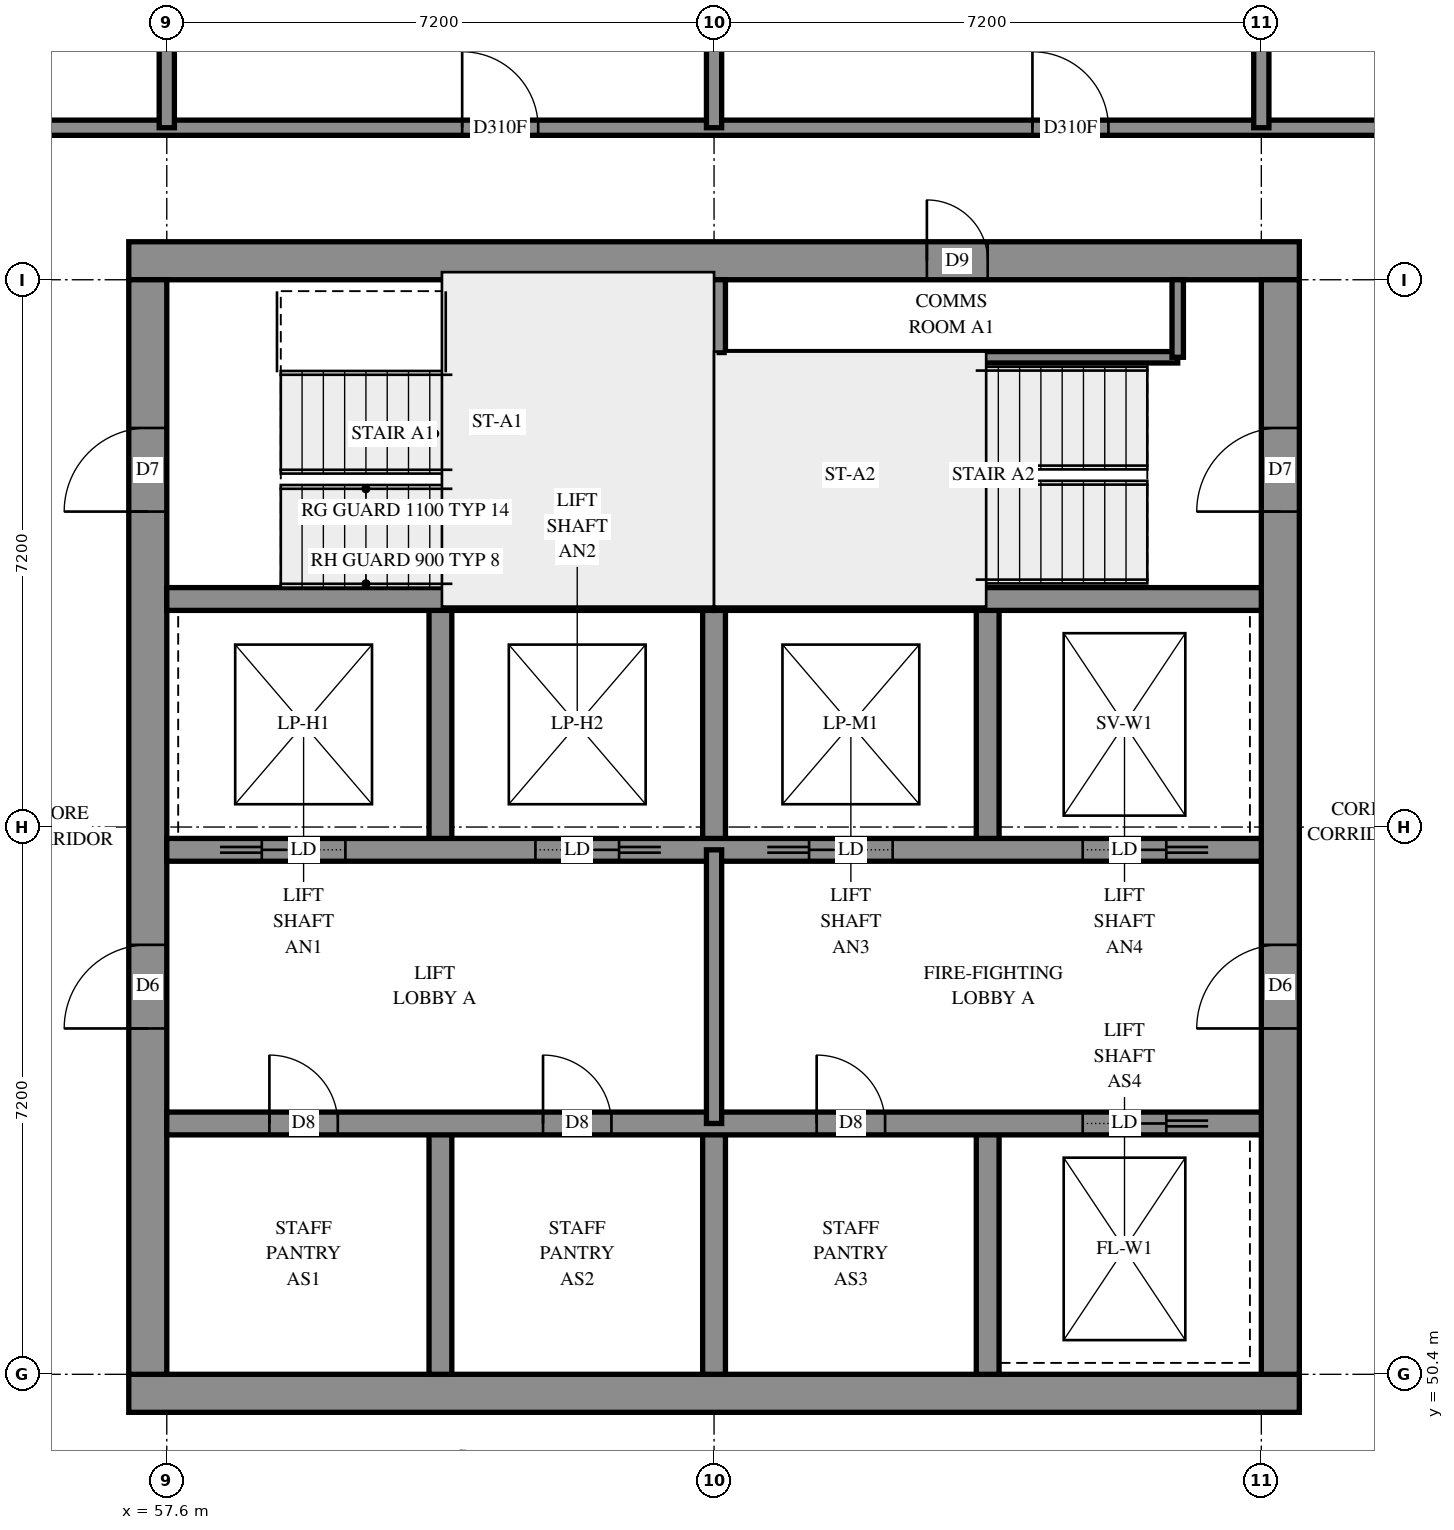
"""IFC4 building model, lengths in metres.
Left out: names, types, materials, properties, quantities, classifications, styles, units other than length and angle.
Written with IfcOpenShell. Run it as: python <this file> out.ifc"""

import sys

from ifc_helpers import new_model, si_unit, direction, frame, frame_2d, origin, place, context, subcontext, project, spatial, rectangle, extrude, element, fill, save


model = new_model("IFC4")
c1 = context("Model", 3, precision=1e-05, world=origin(), true_north=direction((0.0, 1.0)))
c2 = subcontext(c1, "Body", "Model", "MODEL_VIEW")
j1 = project(units=[si_unit("LENGTHUNIT", "METRE"), si_unit("PLANEANGLEUNIT", "RADIAN")], contexts=[c1])
p1 = place(None, origin())
s1 = spatial("IfcSite", under=j1, at=p1, CompositionType="ELEMENT")
p2 = place(p1, origin())
s2 = spatial("IfcBuilding", under=s1, at=p2, CompositionType="ELEMENT")
p3 = place(p2, frame((0.0, 0.0, 193.0)))
s3 = spatial("IfcBuildingStorey", under=s2, at=p3, CompositionType="ELEMENT", Elevation=193.0)
p4 = place(p3, frame((57.1, 50.15, -0.3), z_axis=(0.0, 0.0, 1.0), x_axis=(1.0, 0.0, 0.0)))
e1 = element("IfcWall", 1, at=p4, inside=s3, PredefinedType="SHEAR", context=c2, shape_type="SweptSolid", body=[
    extrude(rectangle(XDim=15.4, YDim=0.5, at=frame_2d((7.7, 0.0))), origin(), (0.0, 0.0, 1.0), 2.7),
])
p5 = place(p3, frame((57.1, 65.05, -0.3), z_axis=(0.0, 0.0, 1.0), x_axis=(1.0, 0.0, 0.0)))
e2 = element("IfcWall", 2, at=p5, inside=s3, PredefinedType="SHEAR", context=c2, shape_type="SweptSolid", body=[
    extrude(rectangle(XDim=15.4, YDim=0.5, at=frame_2d((7.7, 0.0))), origin(), (0.0, 0.0, 1.0), 2.7),
])
p6 = place(p5, frame((10.5, 0.0, 0.3)))
e3 = element("IfcOpeningElement", 3, at=p6, cuts=e2, PredefinedType="OPENING", context=c2, shape_type="SweptSolid", body=[
    extrude(rectangle(XDim=0.8, YDim=2.1, at=frame_2d((0.4, 1.05))), frame((0.0, 0.26, 0.0), z_axis=(0.0, -1.0, 0.0), x_axis=(1.0, 0.0, 0.0)), (0.0, 0.0, 1.0), 0.52),
])
p7 = place(p3, frame((57.35, 50.4, -0.3), z_axis=(0.0, 0.0, 1.0), x_axis=(0.0, 1.0, 0.0)))
e4 = element("IfcWall", 4, at=p7, inside=s3, PredefinedType="SHEAR", context=c2, shape_type="SweptSolid", body=[
    extrude(rectangle(XDim=14.4, YDim=0.5, at=frame_2d((7.2, 0.0))), origin(), (0.0, 0.0, 1.0), 2.7),
])
p8 = place(p7, frame((4.55, 0.0, 0.3)))
e5 = element("IfcOpeningElement", 5, at=p8, cuts=e4, PredefinedType="OPENING", context=c2, shape_type="SweptSolid", body=[
    extrude(rectangle(XDim=1.1, YDim=2.1, at=frame_2d((0.55, 1.05))), frame((0.0, 0.26, 0.0), z_axis=(0.0, -1.0, 0.0), x_axis=(1.0, 0.0, 0.0)), (0.0, 0.0, 1.0), 0.52),
])
p9 = place(p7, frame((11.35, 0.0, 0.3)))
e6 = element("IfcOpeningElement", 6, at=p9, cuts=e4, PredefinedType="OPENING", context=c2, shape_type="SweptSolid", body=[
    extrude(rectangle(XDim=1.1, YDim=2.1, at=frame_2d((0.55, 1.05))), frame((0.0, 0.26, 0.0), z_axis=(0.0, -1.0, 0.0), x_axis=(1.0, 0.0, 0.0)), (0.0, 0.0, 1.0), 0.52),
])
p10 = place(p3, frame((72.25, 50.4, -0.3), z_axis=(0.0, 0.0, 1.0), x_axis=(0.0, 1.0, 0.0)))
e7 = element("IfcWall", 7, at=p10, inside=s3, PredefinedType="SHEAR", context=c2, shape_type="SweptSolid", body=[
    extrude(rectangle(XDim=14.4, YDim=0.5, at=frame_2d((7.2, 0.0))), origin(), (0.0, 0.0, 1.0), 2.7),
])
p11 = place(p10, frame((4.55, 0.0, 0.3)))
e8 = element("IfcOpeningElement", 8, at=p11, cuts=e7, PredefinedType="OPENING", context=c2, shape_type="SweptSolid", body=[
    extrude(rectangle(XDim=1.1, YDim=2.1, at=frame_2d((0.55, 1.05))), frame((0.0, 0.26, 0.0), z_axis=(0.0, -1.0, 0.0), x_axis=(1.0, 0.0, 0.0)), (0.0, 0.0, 1.0), 0.52),
])
p12 = place(p10, frame((11.35, 0.0, 0.3)))
e9 = element("IfcOpeningElement", 9, at=p12, cuts=e7, PredefinedType="OPENING", context=c2, shape_type="SweptSolid", body=[
    extrude(rectangle(XDim=1.1, YDim=2.1, at=frame_2d((0.55, 1.05))), frame((0.0, 0.26, 0.0), z_axis=(0.0, -1.0, 0.0), x_axis=(1.0, 0.0, 0.0)), (0.0, 0.0, 1.0), 0.52),
])
for number, where, z_axis, x_axis in (
    (10, (61.2, 50.4, 0.0), (0.0, 0.0, 1.0), (0.0, 1.0, 0.0)),
    (11, (61.2, 57.3, 0.0), (0.0, 0.0, 1.0), (0.0, 1.0, 0.0)),
    (12, (64.8, 50.4, 0.0), (0.0, 0.0, 1.0), (0.0, 1.0, 0.0)),
    (13, (64.8, 57.3, 0.0), (0.0, 0.0, 1.0), (0.0, 1.0, 0.0)),
    (14, (68.4, 50.4, 0.0), (0.0, 0.0, 1.0), (0.0, 1.0, 0.0)),
    (15, (68.4, 57.3, 0.0), (0.0, 0.0, 1.0), (0.0, 1.0, 0.0)),
):
    element("IfcWall", number, at=place(p3, frame(where, z_axis=z_axis, x_axis=x_axis)), inside=s3, PredefinedType="SOLIDWALL", context=c2, shape_type="SweptSolid", body=[
        extrude(rectangle(XDim=3.3, YDim=0.3, at=frame_2d((1.65, 0.0))), origin(), (0.0, 0.0, 1.0), 3.1),
    ])
p13 = place(p3, frame((57.6, 53.7, 0.0), z_axis=(0.0, 0.0, 1.0), x_axis=(1.0, 0.0, 0.0)))
e16 = element("IfcWall", 16, at=p13, inside=s3, PredefinedType="SOLIDWALL", context=c2, shape_type="SweptSolid", body=[
    extrude(rectangle(XDim=14.4, YDim=0.3, at=frame_2d((7.2, 0.0))), origin(), (0.0, 0.0, 1.0), 3.1),
])
p14 = place(p13, frame((1.35, 0.0, 0.0)))
e17 = element("IfcOpeningElement", 17, at=p14, cuts=e16, PredefinedType="OPENING", context=c2, shape_type="SweptSolid", body=[
    extrude(rectangle(XDim=0.9, YDim=2.1, at=frame_2d((0.45, 1.05))), frame((0.0, 0.16, 0.0), z_axis=(0.0, -1.0, 0.0), x_axis=(1.0, 0.0, 0.0)), (0.0, 0.0, 1.0), 0.32),
])
p15 = place(p13, frame((4.95, 0.0, 0.0)))
e18 = element("IfcOpeningElement", 18, at=p15, cuts=e16, PredefinedType="OPENING", context=c2, shape_type="SweptSolid", body=[
    extrude(rectangle(XDim=0.9, YDim=2.1, at=frame_2d((0.45, 1.05))), frame((0.0, 0.16, 0.0), z_axis=(0.0, -1.0, 0.0), x_axis=(1.0, 0.0, 0.0)), (0.0, 0.0, 1.0), 0.32),
])
p16 = place(p13, frame((8.55, 0.0, 0.0)))
e19 = element("IfcOpeningElement", 19, at=p16, cuts=e16, PredefinedType="OPENING", context=c2, shape_type="SweptSolid", body=[
    extrude(rectangle(XDim=0.9, YDim=2.1, at=frame_2d((0.45, 1.05))), frame((0.0, 0.16, 0.0), z_axis=(0.0, -1.0, 0.0), x_axis=(1.0, 0.0, 0.0)), (0.0, 0.0, 1.0), 0.32),
])
p17 = place(p13, frame((12.05, 0.0, 0.0)))
e20 = element("IfcOpeningElement", 20, at=p17, cuts=e16, PredefinedType="OPENING", context=c2, shape_type="SweptSolid", body=[
    extrude(rectangle(XDim=1.1, YDim=2.1, at=frame_2d((0.55, 1.05))), frame((0.0, 0.16, 0.0), z_axis=(0.0, -1.0, 0.0), x_axis=(1.0, 0.0, 0.0)), (0.0, 0.0, 1.0), 0.32),
])
p18 = place(p3, frame((57.6, 57.3, 0.0), z_axis=(0.0, 0.0, 1.0), x_axis=(1.0, 0.0, 0.0)))
e21 = element("IfcWall", 21, at=p18, inside=s3, PredefinedType="SOLIDWALL", context=c2, shape_type="SweptSolid", body=[
    extrude(rectangle(XDim=14.4, YDim=0.3, at=frame_2d((7.2, 0.0))), origin(), (0.0, 0.0, 1.0), 3.1),
])
p19 = place(p18, frame((1.25, 0.0, 0.0)))
e22 = element("IfcOpeningElement", 22, at=p19, cuts=e21, PredefinedType="OPENING", context=c2, shape_type="SweptSolid", body=[
    extrude(rectangle(XDim=1.1, YDim=2.1, at=frame_2d((0.55, 1.05))), frame((0.0, 0.16, 0.0), z_axis=(0.0, -1.0, 0.0), x_axis=(1.0, 0.0, 0.0)), (0.0, 0.0, 1.0), 0.32),
])
p20 = place(p18, frame((4.85, 0.0, 0.0)))
e23 = element("IfcOpeningElement", 23, at=p20, cuts=e21, PredefinedType="OPENING", context=c2, shape_type="SweptSolid", body=[
    extrude(rectangle(XDim=1.1, YDim=2.1, at=frame_2d((0.55, 1.05))), frame((0.0, 0.16, 0.0), z_axis=(0.0, -1.0, 0.0), x_axis=(1.0, 0.0, 0.0)), (0.0, 0.0, 1.0), 0.32),
])
p21 = place(p18, frame((8.45, 0.0, 0.0)))
e24 = element("IfcOpeningElement", 24, at=p21, cuts=e21, PredefinedType="OPENING", context=c2, shape_type="SweptSolid", body=[
    extrude(rectangle(XDim=1.1, YDim=2.1, at=frame_2d((0.55, 1.05))), frame((0.0, 0.16, 0.0), z_axis=(0.0, -1.0, 0.0), x_axis=(1.0, 0.0, 0.0)), (0.0, 0.0, 1.0), 0.32),
])
p22 = place(p18, frame((12.05, 0.0, 0.0)))
e25 = element("IfcOpeningElement", 25, at=p22, cuts=e21, PredefinedType="OPENING", context=c2, shape_type="SweptSolid", body=[
    extrude(rectangle(XDim=1.1, YDim=2.1, at=frame_2d((0.55, 1.05))), frame((0.0, 0.16, 0.0), z_axis=(0.0, -1.0, 0.0), x_axis=(1.0, 0.0, 0.0)), (0.0, 0.0, 1.0), 0.32),
])
for number, where, z_axis, x_axis in (
    (26, (57.6, 60.6, 0.0), (0.0, 0.0, 1.0), (1.0, 0.0, 0.0)),
    (27, (64.8, 60.6, 0.0), (0.0, 0.0, 1.0), (1.0, 0.0, 0.0)),
):
    element("IfcWall", number, at=place(p3, frame(where, z_axis=z_axis, x_axis=x_axis)), inside=s3, PredefinedType="SOLIDWALL", context=c2, shape_type="SweptSolid", body=[
        extrude(rectangle(XDim=7.2, YDim=0.3, at=frame_2d((3.6, 0.0))), origin(), (0.0, 0.0, 1.0), 3.1),
    ])
p23 = place(p3, frame((64.8, 60.6, 0.0), z_axis=(0.0, 0.0, 1.0), x_axis=(0.0, 1.0, 0.0)))
e28 = element("IfcWall", 28, at=p23, inside=s3, PredefinedType="SOLIDWALL", context=c2, shape_type="SweptSolid", body=[
    extrude(rectangle(XDim=4.2, YDim=0.3, at=frame_2d((2.1, 0.0))), origin(), (0.0, 0.0, 1.0), 3.1),
])
p24 = place(p3, frame((64.95, 63.78, 0.0), z_axis=(0.0, 0.0, 1.0), x_axis=(1.0, 0.0, 0.0)))
e29 = element("IfcWall", 29, at=p24, inside=s3, PredefinedType="PARTITIONING", context=c2, shape_type="SweptSolid", body=[
    extrude(rectangle(XDim=5.95, YDim=0.15, at=frame_2d((2.975, 0.0))), origin(), (0.0, 0.0, 1.0), 3.1),
])
p25 = place(p3, frame((70.9, 63.78, 0.0), z_axis=(0.0, 0.0, 1.0), x_axis=(0.0, 1.0, 0.0)))
e30 = element("IfcWall", 30, at=p25, inside=s3, PredefinedType="PARTITIONING", context=c2, shape_type="SweptSolid", body=[
    extrude(rectangle(XDim=1.02, YDim=0.15, at=frame_2d((0.51, 0.0))), origin(), (0.0, 0.0, 1.0), 3.1),
])
p26 = place(p3, frame((64.8, 53.7, 0.0), z_axis=(0.0, 0.0, 1.0), x_axis=(0.0, 1.0, 0.0)))
e31 = element("IfcWall", 31, at=p26, inside=s3, PredefinedType="PARTITIONING", context=c2, shape_type="SweptSolid", body=[
    extrude(rectangle(XDim=3.6, YDim=0.2, at=frame_2d((1.8, 0.0))), origin(), (0.0, 0.0, 1.0), 3.1),
])
p27 = place(p3, frame((55.6, 66.8, 0.0), z_axis=(0.0, 0.0, 1.0), x_axis=(1.0, 0.0, 0.0)))
e32 = element("IfcWall", 32, at=p27, inside=s3, PredefinedType="PARTITIONING", context=c2, shape_type="SweptSolid", body=[
    extrude(rectangle(XDim=18.4, YDim=0.2, at=frame_2d((9.2, 0.0))), origin(), (0.0, 0.0, 1.0), 3.1),
])
p28 = place(p27, frame((5.886, 0.0, 0.0)))
e33 = element("IfcOpeningElement", 33, at=p28, cuts=e32, PredefinedType="OPENING", context=c2, shape_type="SweptSolid", body=[
    extrude(rectangle(XDim=1.0, YDim=2.1, at=frame_2d((0.5, 1.05))), frame((0.0, 0.11, 0.0), z_axis=(0.0, -1.0, 0.0), x_axis=(1.0, 0.0, 0.0)), (0.0, 0.0, 1.0), 0.22),
])
p29 = place(p27, frame((13.389, 0.0, 0.0)))
e34 = element("IfcOpeningElement", 34, at=p29, cuts=e32, PredefinedType="OPENING", context=c2, shape_type="SweptSolid", body=[
    extrude(rectangle(XDim=1.0, YDim=2.1, at=frame_2d((0.5, 1.05))), frame((0.0, 0.11, 0.0), z_axis=(0.0, -1.0, 0.0), x_axis=(1.0, 0.0, 0.0)), (0.0, 0.0, 1.0), 0.22),
])
for number, where, z_axis, x_axis in (
    (35, (57.6, 66.8, 0.0), (0.0, 0.0, 1.0), (0.0, 1.0, 0.0)),
    (36, (64.8, 66.8, 0.0), (0.0, 0.0, 1.0), (0.0, 1.0, 0.0)),
):
    element("IfcWall", number, at=place(p3, frame(where, z_axis=z_axis, x_axis=x_axis)), inside=s3, PredefinedType="PARTITIONING", context=c2, shape_type="SweptSolid", body=[
        extrude(rectangle(XDim=4.8, YDim=0.2, at=frame_2d((2.4, 0.0))), origin(), (0.0, 0.0, 1.0), 3.1),
    ])
p30 = place(p3, frame((72.0, 66.8, 0.0), z_axis=(0.0, 0.0, 1.0), x_axis=(0.0, 1.0, 0.0)))
e37 = element("IfcWall", 37, at=p30, inside=s3, PredefinedType="PARTITIONING", context=c2, shape_type="SweptSolid", body=[
    extrude(rectangle(XDim=4.696, YDim=0.2, at=frame_2d((2.348, 0.0))), origin(), (0.0, 0.0, 1.0), 3.1),
])
p31 = place(p6, origin())
e38 = element("IfcDoor", 38, at=p31, inside=s3, OperationType="SINGLE_SWING_RIGHT", PredefinedType="DOOR", context=c2, shape_type="SweptSolid", body=[
    extrude(rectangle(XDim=0.8, YDim=2.1, at=frame_2d((0.4, 1.05))), frame((0.0, 0.025, 0.0), z_axis=(0.0, -1.0, 0.0), x_axis=(1.0, 0.0, 0.0)), (0.0, 0.0, 1.0), 0.05),
])
fill(e3, e38)
p32 = place(p8, origin())
e39 = element("IfcDoor", 39, at=p32, inside=s3, OperationType="DOUBLE_DOOR_SINGLE_SWING", PredefinedType="DOOR", context=c2, shape_type="SweptSolid", body=[
    extrude(rectangle(XDim=1.1, YDim=2.1, at=frame_2d((0.55, 1.05))), frame((0.0, 0.025, 0.0), z_axis=(0.0, -1.0, 0.0), x_axis=(1.0, 0.0, 0.0)), (0.0, 0.0, 1.0), 0.05),
])
fill(e5, e39)
p33 = place(p11, origin())
e40 = element("IfcDoor", 40, at=p33, inside=s3, OperationType="DOUBLE_DOOR_SINGLE_SWING", PredefinedType="DOOR", context=c2, shape_type="SweptSolid", body=[
    extrude(rectangle(XDim=1.1, YDim=2.1, at=frame_2d((0.55, 1.05))), frame((0.0, 0.025, 0.0), z_axis=(0.0, -1.0, 0.0), x_axis=(1.0, 0.0, 0.0)), (0.0, 0.0, 1.0), 0.05),
])
fill(e8, e40)
p34 = place(p9, origin())
e41 = element("IfcDoor", 41, at=p34, inside=s3, OperationType="SINGLE_SWING_LEFT", PredefinedType="DOOR", context=c2, shape_type="SweptSolid", body=[
    extrude(rectangle(XDim=1.1, YDim=2.1, at=frame_2d((0.55, 1.05))), frame((0.0, 0.025, 0.0), z_axis=(0.0, -1.0, 0.0), x_axis=(1.0, 0.0, 0.0)), (0.0, 0.0, 1.0), 0.05),
])
fill(e6, e41)
p35 = place(p12, origin())
e42 = element("IfcDoor", 42, at=p35, inside=s3, OperationType="SINGLE_SWING_RIGHT", PredefinedType="DOOR", context=c2, shape_type="SweptSolid", body=[
    extrude(rectangle(XDim=1.1, YDim=2.1, at=frame_2d((0.55, 1.05))), frame((0.0, 0.025, 0.0), z_axis=(0.0, -1.0, 0.0), x_axis=(1.0, 0.0, 0.0)), (0.0, 0.0, 1.0), 0.05),
])
fill(e9, e42)
p36 = place(p14, origin())
e43 = element("IfcDoor", 43, at=p36, inside=s3, OperationType="SINGLE_SWING_LEFT", PredefinedType="DOOR", context=c2, shape_type="SweptSolid", body=[
    extrude(rectangle(XDim=0.9, YDim=2.1, at=frame_2d((0.45, 1.05))), frame((0.0, 0.025, 0.0), z_axis=(0.0, -1.0, 0.0), x_axis=(1.0, 0.0, 0.0)), (0.0, 0.0, 1.0), 0.05),
])
fill(e17, e43)
p37 = place(p15, origin())
e44 = element("IfcDoor", 44, at=p37, inside=s3, OperationType="SINGLE_SWING_LEFT", PredefinedType="DOOR", context=c2, shape_type="SweptSolid", body=[
    extrude(rectangle(XDim=0.9, YDim=2.1, at=frame_2d((0.45, 1.05))), frame((0.0, 0.025, 0.0), z_axis=(0.0, -1.0, 0.0), x_axis=(1.0, 0.0, 0.0)), (0.0, 0.0, 1.0), 0.05),
])
fill(e18, e44)
p38 = place(p16, origin())
e45 = element("IfcDoor", 45, at=p38, inside=s3, OperationType="SINGLE_SWING_LEFT", PredefinedType="DOOR", context=c2, shape_type="SweptSolid", body=[
    extrude(rectangle(XDim=0.9, YDim=2.1, at=frame_2d((0.45, 1.05))), frame((0.0, 0.025, 0.0), z_axis=(0.0, -1.0, 0.0), x_axis=(1.0, 0.0, 0.0)), (0.0, 0.0, 1.0), 0.05),
])
fill(e19, e45)
p39 = place(p17, origin())
e46 = element("IfcDoor", 46, at=p39, inside=s3, OperationType="SLIDING_TO_RIGHT", PredefinedType="DOOR", context=c2, shape_type="SweptSolid", body=[
    extrude(rectangle(XDim=1.1, YDim=2.1, at=frame_2d((0.55, 1.05))), frame((0.0, 0.025, 0.0), z_axis=(0.0, -1.0, 0.0), x_axis=(1.0, 0.0, 0.0)), (0.0, 0.0, 1.0), 0.05),
])
fill(e20, e46)
p40 = place(p19, origin())
e47 = element("IfcDoor", 47, at=p40, inside=s3, OperationType="SLIDING_TO_LEFT", PredefinedType="DOOR", context=c2, shape_type="SweptSolid", body=[
    extrude(rectangle(XDim=1.1, YDim=2.1, at=frame_2d((0.55, 1.05))), frame((0.0, 0.025, 0.0), z_axis=(0.0, -1.0, 0.0), x_axis=(1.0, 0.0, 0.0)), (0.0, 0.0, 1.0), 0.05),
])
fill(e22, e47)
p41 = place(p20, origin())
e48 = element("IfcDoor", 48, at=p41, inside=s3, OperationType="SLIDING_TO_RIGHT", PredefinedType="DOOR", context=c2, shape_type="SweptSolid", body=[
    extrude(rectangle(XDim=1.1, YDim=2.1, at=frame_2d((0.55, 1.05))), frame((0.0, 0.025, 0.0), z_axis=(0.0, -1.0, 0.0), x_axis=(1.0, 0.0, 0.0)), (0.0, 0.0, 1.0), 0.05),
])
fill(e23, e48)
p42 = place(p21, origin())
e49 = element("IfcDoor", 49, at=p42, inside=s3, OperationType="SLIDING_TO_LEFT", PredefinedType="DOOR", context=c2, shape_type="SweptSolid", body=[
    extrude(rectangle(XDim=1.1, YDim=2.1, at=frame_2d((0.55, 1.05))), frame((0.0, 0.025, 0.0), z_axis=(0.0, -1.0, 0.0), x_axis=(1.0, 0.0, 0.0)), (0.0, 0.0, 1.0), 0.05),
])
fill(e24, e49)
p43 = place(p22, origin())
e50 = element("IfcDoor", 50, at=p43, inside=s3, OperationType="SLIDING_TO_RIGHT", PredefinedType="DOOR", context=c2, shape_type="SweptSolid", body=[
    extrude(rectangle(XDim=1.1, YDim=2.1, at=frame_2d((0.55, 1.05))), frame((0.0, 0.025, 0.0), z_axis=(0.0, -1.0, 0.0), x_axis=(1.0, 0.0, 0.0)), (0.0, 0.0, 1.0), 0.05),
])
fill(e25, e50)
p44 = place(p28, origin())
e51 = element("IfcDoor", 51, at=p44, inside=s3, OperationType="SINGLE_SWING_RIGHT", PredefinedType="DOOR", context=c2, shape_type="SweptSolid", body=[
    extrude(rectangle(XDim=1.0, YDim=2.1, at=frame_2d((0.5, 1.05))), frame((0.0, 0.025, 0.0), z_axis=(0.0, -1.0, 0.0), x_axis=(1.0, 0.0, 0.0)), (0.0, 0.0, 1.0), 0.05),
])
fill(e33, e51)
p45 = place(p29, origin())
e52 = element("IfcDoor", 52, at=p45, inside=s3, OperationType="SINGLE_SWING_RIGHT", PredefinedType="DOOR", context=c2, shape_type="SweptSolid", body=[
    extrude(rectangle(XDim=1.0, YDim=2.1, at=frame_2d((0.5, 1.05))), frame((0.0, 0.025, 0.0), z_axis=(0.0, -1.0, 0.0), x_axis=(1.0, 0.0, 0.0)), (0.0, 0.0, 1.0), 0.05),
])
fill(e34, e52)
save(model, sys.argv[1])
